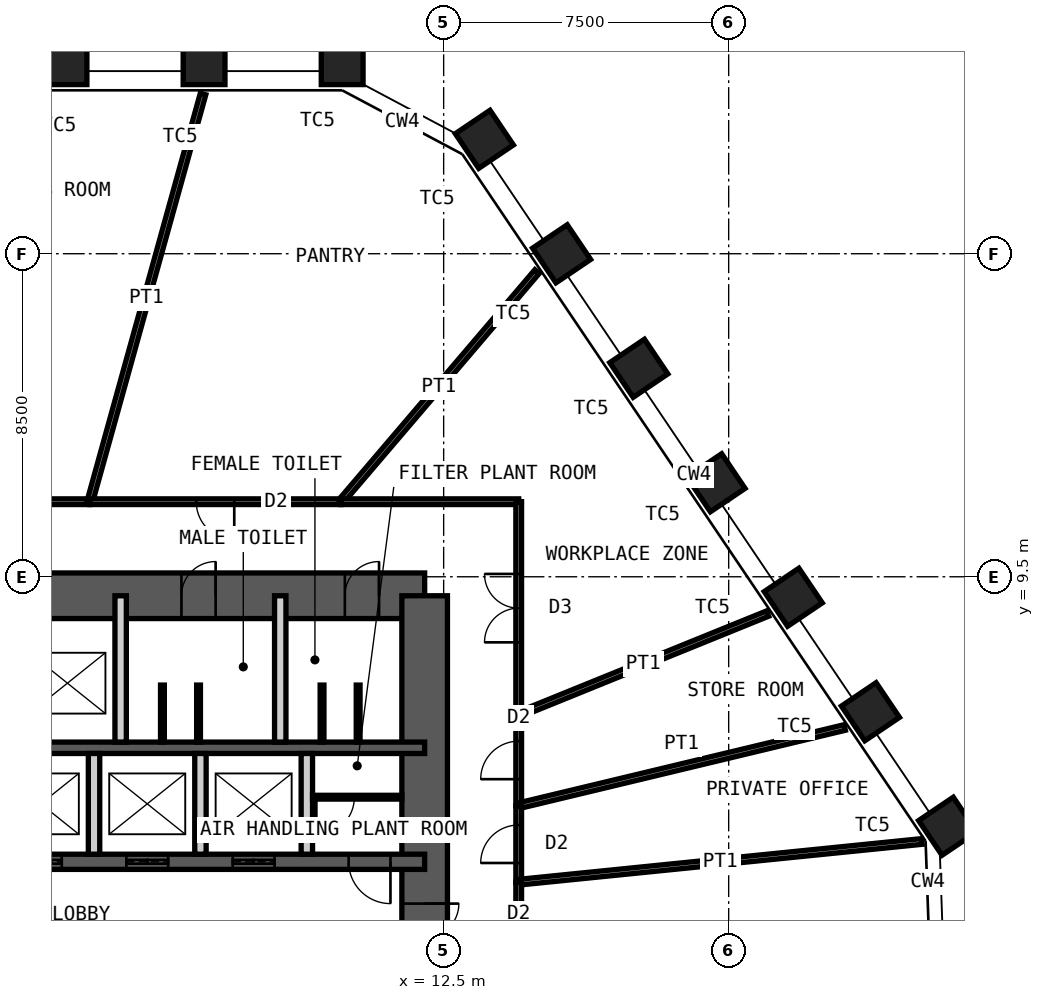
"""IFC4 building model, lengths in metres.
Left out: names, types, materials, properties, quantities, classifications, styles, units other than length and angle.
Written with IfcOpenShell. Run it as: python <this file> out.ifc"""

import sys

from ifc_helpers import new_model, si_unit, direction, frame, frame_2d, origin, origin_2d, place, context, subcontext, project, spatial, rectangle, hollow_rectangle, extrude, element, fill, save


model = new_model("IFC4")
c1 = context("Model", 3, precision=1e-05, world=origin(), true_north=direction((0.0, 1.0)))
c2 = subcontext(c1, "Body", "Model", "MODEL_VIEW")
j1 = project(units=[si_unit("LENGTHUNIT", "METRE"), si_unit("PLANEANGLEUNIT", "RADIAN")], contexts=[c1])
p1 = place(None, origin())
s1 = spatial("IfcSite", under=j1, at=p1, CompositionType="ELEMENT")
p2 = place(p1, origin())
s2 = spatial("IfcBuilding", under=s1, at=p2, CompositionType="ELEMENT")
p3 = place(p2, frame((0.0, 0.0, 209.8)))
s3 = spatial("IfcBuildingStorey", under=s2, at=p3, CompositionType="ELEMENT", Elevation=209.8)
for number, where, z_axis, x_axis in (
    (1, (2.562, 23.0, 0.0), (0.0, 0.0, 1.0), (-1.0, 0.0, 0.0)),
    (2, (6.196, 23.0, 0.0), (0.0, 0.0, 1.0), (-1.0, 0.0, 0.0)),
    (3, (9.829, 23.0, 0.0), (0.0, 0.0, 1.0), (-1.0, 0.0, 0.0)),
    (4, (13.571, 21.01, 0.0), (0.0, 0.0, 1.0), (-0.559, 0.829, 0.0)),
    (5, (15.603, 17.998, 0.0), (0.0, 0.0, 1.0), (-0.559, 0.829, 0.0)),
    (6, (17.635, 14.986, 0.0), (0.0, 0.0, 1.0), (-0.559, 0.829, 0.0)),
    (7, (19.667, 11.973, 0.0), (0.0, 0.0, 1.0), (-0.559, 0.829, 0.0)),
    (8, (21.699, 8.961, 0.0), (0.0, 0.0, 1.0), (-0.559, 0.829, 0.0)),
    (9, (23.731, 5.948, 0.0), (0.0, 0.0, 1.0), (-0.559, 0.829, 0.0)),
    (10, (25.762, 2.936, 0.0), (0.0, 0.0, 1.0), (-0.559, 0.829, 0.0)),
):
    element("IfcColumn", number, at=place(p3, frame(where, z_axis=z_axis, x_axis=x_axis)), inside=s3, PredefinedType="COLUMN", context=c2, shape_type="SweptSolid", body=[
        extrude(hollow_rectangle(XDim=1.1, YDim=1.1, WallThickness=0.07, at=origin_2d()), origin(), (0.0, 0.0, 1.0), 4.2),
    ])
p4 = place(p3, frame((-12.0, 9.0, 0.0), z_axis=(0.0, 0.0, 1.0), x_axis=(1.0, 0.0, 0.0)))
e11 = element("IfcWall", 11, at=p4, inside=s3, PredefinedType="SHEAR", context=c2, shape_type="SweptSolid", body=[
    extrude(rectangle(XDim=24.0, YDim=1.2, at=frame_2d((12.0, 0.0))), origin(), (0.0, 0.0, 1.0), 4.2),
])
p5 = place(p4, frame((10.4, 0.0, 0.0)))
e12 = element("IfcOpeningElement", 12, at=p5, cuts=e11, PredefinedType="OPENING", context=c2, shape_type="SweptSolid", body=[
    extrude(rectangle(XDim=1.0, YDim=2.1, at=frame_2d((0.5, 1.05))), frame((0.0, 0.61, 0.0), z_axis=(0.0, -1.0, 0.0), x_axis=(1.0, 0.0, 0.0)), (0.0, 0.0, 1.0), 1.22),
])
p6 = place(p4, frame((17.6, 0.0, 0.0)))
e13 = element("IfcOpeningElement", 13, at=p6, cuts=e11, PredefinedType="OPENING", context=c2, shape_type="SweptSolid", body=[
    extrude(rectangle(XDim=0.9, YDim=2.1, at=frame_2d((0.45, 1.05))), frame((0.0, 0.61, 0.0), z_axis=(0.0, -1.0, 0.0), x_axis=(1.0, 0.0, 0.0)), (0.0, 0.0, 1.0), 1.22),
])
p7 = place(p4, frame((21.9, 0.0, 0.0)))
e14 = element("IfcOpeningElement", 14, at=p7, cuts=e11, PredefinedType="OPENING", context=c2, shape_type="SweptSolid", body=[
    extrude(rectangle(XDim=0.9, YDim=2.1, at=frame_2d((0.45, 1.05))), frame((0.0, 0.61, 0.0), z_axis=(0.0, -1.0, 0.0), x_axis=(1.0, 0.0, 0.0)), (0.0, 0.0, 1.0), 1.22),
])
p8 = place(p3, frame((12.0, -9.0, 0.0), z_axis=(0.0, 0.0, 1.0), x_axis=(0.0, 1.0, 0.0)))
e15 = element("IfcWall", 15, at=p8, inside=s3, PredefinedType="SHEAR", context=c2, shape_type="SweptSolid", body=[
    extrude(rectangle(XDim=18.0, YDim=1.2, at=frame_2d((9.0, 0.0))), origin(), (0.0, 0.0, 1.0), 4.2),
])
p9 = place(p8, frame((8.1, 0.0, 0.0)))
e16 = element("IfcOpeningElement", 16, at=p9, cuts=e15, PredefinedType="OPENING", context=c2, shape_type="SweptSolid", body=[
    extrude(rectangle(XDim=1.8, YDim=2.1, at=frame_2d((0.9, 1.05))), frame((0.0, 0.61, 0.0), z_axis=(0.0, -1.0, 0.0), x_axis=(1.0, 0.0, 0.0)), (0.0, 0.0, 1.0), 1.22),
])
p10 = place(p3, frame((-12.0, 5.0, 0.0), z_axis=(0.0, 0.0, 1.0), x_axis=(1.0, 0.0, 0.0)))
e17 = element("IfcWall", 17, at=p10, inside=s3, PredefinedType="SHEAR", context=c2, shape_type="SweptSolid", body=[
    extrude(rectangle(XDim=24.0, YDim=0.3, at=frame_2d((12.0, 0.0))), origin(), (0.0, 0.0, 1.0), 4.2),
])
p11 = place(p3, frame((-12.0, 2.0, 0.0), z_axis=(0.0, 0.0, 1.0), x_axis=(1.0, 0.0, 0.0)))
e18 = element("IfcWall", 18, at=p11, inside=s3, PredefinedType="SHEAR", context=c2, shape_type="SweptSolid", body=[
    extrude(rectangle(XDim=24.0, YDim=0.4, at=frame_2d((12.0, 0.0))), origin(), (0.0, 0.0, 1.0), 4.2),
])
p12 = place(p11, frame((2.4, 0.0, 0.0)))
e19 = element("IfcOpeningElement", 19, at=p12, cuts=e18, PredefinedType="OPENING", context=c2, shape_type="SweptSolid", body=[
    extrude(rectangle(XDim=1.1, YDim=2.1, at=frame_2d((0.55, 1.05))), frame((0.0, 0.21, 0.0), z_axis=(0.0, -1.0, 0.0), x_axis=(1.0, 0.0, 0.0)), (0.0, 0.0, 1.0), 0.42),
])
p13 = place(p11, frame((22.0, 0.0, 0.0)))
e20 = element("IfcOpeningElement", 20, at=p13, cuts=e18, PredefinedType="OPENING", context=c2, shape_type="SweptSolid", body=[
    extrude(rectangle(XDim=1.1, YDim=2.1, at=frame_2d((0.55, 1.05))), frame((0.0, 0.21, 0.0), z_axis=(0.0, -1.0, 0.0), x_axis=(1.0, 0.0, 0.0)), (0.0, 0.0, 1.0), 0.42),
])
p14 = place(p11, frame((10.15, 0.0, 0.0)))
e21 = element("IfcOpeningElement", 21, at=p14, cuts=e18, PredefinedType="OPENING", context=c2, shape_type="SweptSolid", body=[
    extrude(rectangle(XDim=1.0, YDim=2.1, at=frame_2d((0.5, 1.05))), frame((0.0, 0.21, 0.0), z_axis=(0.0, -1.0, 0.0), x_axis=(1.0, 0.0, 0.0)), (0.0, 0.0, 1.0), 0.42),
])
p15 = place(p11, frame((6.9, 0.0, 0.0)))
e22 = element("IfcOpeningElement", 22, at=p15, cuts=e18, PredefinedType="OPENING", context=c2, shape_type="SweptSolid", body=[
    extrude(rectangle(XDim=1.0, YDim=2.1, at=frame_2d((0.5, 1.05))), frame((0.0, 0.21, 0.0), z_axis=(0.0, -1.0, 0.0), x_axis=(1.0, 0.0, 0.0)), (0.0, 0.0, 1.0), 0.42),
])
p16 = place(p11, frame((13.35, 0.0, 0.0)))
e23 = element("IfcOpeningElement", 23, at=p16, cuts=e18, PredefinedType="OPENING", context=c2, shape_type="SweptSolid", body=[
    extrude(rectangle(XDim=1.1, YDim=2.4, at=frame_2d((0.55, 1.2))), frame((0.0, 0.21, 0.0), z_axis=(0.0, -1.0, 0.0), x_axis=(1.0, 0.0, 0.0)), (0.0, 0.0, 1.0), 0.42),
])
p17 = place(p11, frame((16.15, 0.0, 0.0)))
e24 = element("IfcOpeningElement", 24, at=p17, cuts=e18, PredefinedType="OPENING", context=c2, shape_type="SweptSolid", body=[
    extrude(rectangle(XDim=1.1, YDim=2.4, at=frame_2d((0.55, 1.2))), frame((0.0, 0.21, 0.0), z_axis=(0.0, -1.0, 0.0), x_axis=(1.0, 0.0, 0.0)), (0.0, 0.0, 1.0), 0.42),
])
p18 = place(p11, frame((18.95, 0.0, 0.0)))
e25 = element("IfcOpeningElement", 25, at=p18, cuts=e18, PredefinedType="OPENING", context=c2, shape_type="SweptSolid", body=[
    extrude(rectangle(XDim=1.1, YDim=2.4, at=frame_2d((0.55, 1.2))), frame((0.0, 0.21, 0.0), z_axis=(0.0, -1.0, 0.0), x_axis=(1.0, 0.0, 0.0)), (0.0, 0.0, 1.0), 0.42),
])
for number, where, z_axis, x_axis in (
    (26, (4.0, 5.15, 0.0), (0.0, 0.0, 1.0), (0.0, 1.0, 0.0)),
    (27, (8.2, 5.15, 0.0), (0.0, 0.0, 1.0), (0.0, 1.0, 0.0)),
):
    element("IfcWall", number, at=place(p3, frame(where, z_axis=z_axis, x_axis=x_axis)), inside=s3, PredefinedType="PARTITIONING", context=c2, shape_type="SweptSolid", body=[
        extrude(rectangle(XDim=3.85, YDim=0.3, at=frame_2d((1.925, 0.0))), origin(), (0.0, 0.0, 1.0), 3.98),
    ])
for number, where, z_axis, x_axis in (
    (28, (3.3, 2.2, 0.0), (0.0, 0.0, 1.0), (0.0, 1.0, 0.0)),
    (29, (6.1, 2.2, 0.0), (0.0, 0.0, 1.0), (0.0, 1.0, 0.0)),
    (30, (8.9, 2.2, 0.0), (0.0, 0.0, 1.0), (0.0, 1.0, 0.0)),
):
    element("IfcWall", number, at=place(p3, frame(where, z_axis=z_axis, x_axis=x_axis)), inside=s3, PredefinedType="PARTITIONING", context=c2, shape_type="SweptSolid", body=[
        extrude(rectangle(XDim=2.65, YDim=0.3, at=frame_2d((1.325, 0.0))), origin(), (0.0, 0.0, 1.0), 3.98),
    ])
p19 = place(p3, frame((9.05, 3.7, 0.0), z_axis=(0.0, 0.0, 1.0), x_axis=(1.0, 0.0, 0.0)))
e31 = element("IfcWall", 31, at=p19, inside=s3, PredefinedType="PARTITIONING", context=c2, shape_type="SweptSolid", body=[
    extrude(rectangle(XDim=2.35, YDim=0.1, at=frame_2d((1.175, 0.0))), origin(), (0.0, 0.0, 1.0), 3.98),
])
p20 = place(p19, frame((0.1, 0.0, 0.0)))
e32 = element("IfcOpeningElement", 32, at=p20, cuts=e31, PredefinedType="OPENING", context=c2, shape_type="SweptSolid", body=[
    extrude(rectangle(XDim=1.0, YDim=2.4, at=frame_2d((0.5, 1.2))), frame((0.0, 0.06, 0.0), z_axis=(0.0, -1.0, 0.0), x_axis=(1.0, 0.0, 0.0)), (0.0, 0.0, 1.0), 0.12),
])
for number, where, z_axis, x_axis in (
    (33, (5.1, 5.15, 0.0), (0.0, 0.0, 1.0), (0.0, 1.0, 0.0)),
    (34, (6.05, 5.15, 0.0), (0.0, 0.0, 1.0), (0.0, 1.0, 0.0)),
    (35, (9.3, 5.15, 0.0), (0.0, 0.0, 1.0), (0.0, 1.0, 0.0)),
    (36, (10.25, 5.15, 0.0), (0.0, 0.0, 1.0), (0.0, 1.0, 0.0)),
):
    element("IfcWall", number, at=place(p3, frame(where, z_axis=z_axis, x_axis=x_axis)), inside=s3, PredefinedType="PARTITIONING", context=c2, shape_type="SweptSolid", body=[
        extrude(rectangle(XDim=1.5, YDim=0.1, at=frame_2d((0.75, 0.0))), origin(), (0.0, 0.0, 1.0), 2.1),
    ])
p21 = place(p3, frame((-0.551, 11.475, 0.0), z_axis=(0.0, 0.0, 1.0), x_axis=(1.0, 0.0, 0.0)))
e37 = element("IfcWall", 37, at=p21, inside=s3, PredefinedType="PARTITIONING", context=c2, shape_type="SweptSolid", body=[
    extrude(rectangle(XDim=3.74, YDim=0.15, at=frame_2d((1.87, 0.0))), origin(), (0.0, 0.0, 1.0), 4.03),
])
p22 = place(p21, frame((1.37, 0.0, 0.0)))
e38 = element("IfcOpeningElement", 38, at=p22, cuts=e37, PredefinedType="OPENING", context=c2, shape_type="SweptSolid", body=[
    extrude(rectangle(XDim=1.0, YDim=2.4, at=frame_2d((0.5, 1.2))), frame((0.0, 0.085, 0.0), z_axis=(0.0, -1.0, 0.0), x_axis=(1.0, 0.0, 0.0)), (0.0, 0.0, 1.0), 0.17),
])
p23 = place(p3, frame((6.169, 22.204, 0.0), z_axis=(0.0, 0.0, 1.0), x_axis=(-0.26769135876, -0.963504715321, 0.0)))
e39 = element("IfcWall", 39, at=p23, inside=s3, PredefinedType="PARTITIONING", context=c2, shape_type="SweptSolid", body=[
    extrude(rectangle(XDim=11.135, YDim=0.15, at=frame_2d((5.567, 0.0))), origin(), (0.0, 0.0, 1.0), 3.43),
])
p24 = place(p3, frame((3.188, 11.475, 0.0), z_axis=(0.0, 0.0, 1.0), x_axis=(1.0, 0.0, 0.0)))
e40 = element("IfcWall", 40, at=p24, inside=s3, PredefinedType="PARTITIONING", context=c2, shape_type="SweptSolid", body=[
    extrude(rectangle(XDim=6.603, YDim=0.15, at=frame_2d((3.301, 0.0))), origin(), (0.0, 0.0, 1.0), 4.03),
])
p25 = place(p24, frame((2.802, 0.0, 0.0)))
e41 = element("IfcOpeningElement", 41, at=p25, cuts=e40, PredefinedType="OPENING", context=c2, shape_type="SweptSolid", body=[
    extrude(rectangle(XDim=1.0, YDim=2.4, at=frame_2d((0.5, 1.2))), frame((0.0, 0.085, 0.0), z_axis=(0.0, -1.0, 0.0), x_axis=(1.0, 0.0, 0.0)), (0.0, 0.0, 1.0), 0.17),
])
p26 = place(p3, frame((14.958, 17.531, 0.0), z_axis=(0.0, 0.0, 1.0), x_axis=(-0.649097500837, -0.760705221756, 0.0)))
e42 = element("IfcWall", 42, at=p26, inside=s3, PredefinedType="PARTITIONING", context=c2, shape_type="SweptSolid", body=[
    extrude(rectangle(XDim=7.96, YDim=0.15, at=frame_2d((3.98, 0.0))), origin(), (0.0, 0.0, 1.0), 3.43),
])
p27 = place(p3, frame((9.791, 11.475, 0.0), z_axis=(0.0, 0.0, 1.0), x_axis=(1.0, 0.0, 0.0)))
e43 = element("IfcWall", 43, at=p27, inside=s3, PredefinedType="PARTITIONING", context=c2, shape_type="SweptSolid", body=[
    extrude(rectangle(XDim=4.684, YDim=0.15, at=frame_2d((2.342, 0.0))), origin(), (0.0, 0.0, 1.0), 4.03),
])
p28 = place(p3, frame((14.475, 11.475, 0.0), z_axis=(0.0, 0.0, 1.0), x_axis=(0.0, -1.0, 0.0)))
e44 = element("IfcWall", 44, at=p28, inside=s3, PredefinedType="PARTITIONING", context=c2, shape_type="SweptSolid", body=[
    extrude(rectangle(XDim=5.601, YDim=0.15, at=frame_2d((2.801, 0.0))), origin(), (0.0, 0.0, 1.0), 4.03),
])
p29 = place(p28, frame((1.901, 0.0, 0.0)))
e45 = element("IfcOpeningElement", 45, at=p29, cuts=e44, PredefinedType="OPENING", context=c2, shape_type="SweptSolid", body=[
    extrude(rectangle(XDim=1.8, YDim=2.4, at=frame_2d((0.9, 1.2))), frame((0.0, 0.085, 0.0), z_axis=(0.0, -1.0, 0.0), x_axis=(1.0, 0.0, 0.0)), (0.0, 0.0, 1.0), 0.17),
])
p30 = place(p3, frame((21.026, 8.532, 0.0), z_axis=(0.0, 0.0, 1.0), x_axis=(-0.926617028548, -0.376006492503, 0.0)))
e46 = element("IfcWall", 46, at=p30, inside=s3, PredefinedType="PARTITIONING", context=c2, shape_type="SweptSolid", body=[
    extrude(rectangle(XDim=7.07, YDim=0.15, at=frame_2d((3.535, 0.0))), origin(), (0.0, 0.0, 1.0), 3.43),
])
p31 = place(p3, frame((14.475, 5.874, 0.0), z_axis=(0.0, 0.0, 1.0), x_axis=(0.0, -1.0, 0.0)))
e47 = element("IfcWall", 47, at=p31, inside=s3, PredefinedType="PARTITIONING", context=c2, shape_type="SweptSolid", body=[
    extrude(rectangle(XDim=2.399, YDim=0.15, at=frame_2d((1.2, 0.0))), origin(), (0.0, 0.0, 1.0), 4.03),
])
p32 = place(p31, frame((0.699, 0.0, 0.0)))
e48 = element("IfcOpeningElement", 48, at=p32, cuts=e47, PredefinedType="OPENING", context=c2, shape_type="SweptSolid", body=[
    extrude(rectangle(XDim=1.0, YDim=2.4, at=frame_2d((0.5, 1.2))), frame((0.0, 0.085, 0.0), z_axis=(0.0, -1.0, 0.0), x_axis=(1.0, 0.0, 0.0)), (0.0, 0.0, 1.0), 0.17),
])
p33 = place(p3, frame((23.053, 5.534, 0.0), z_axis=(0.0, 0.0, 1.0), x_axis=(-0.972377252501, -0.233414821335, 0.0)))
e49 = element("IfcWall", 49, at=p33, inside=s3, PredefinedType="PARTITIONING", context=c2, shape_type="SweptSolid", body=[
    extrude(rectangle(XDim=8.822, YDim=0.15, at=frame_2d((4.411, 0.0))), origin(), (0.0, 0.0, 1.0), 3.43),
])
p34 = place(p3, frame((14.475, 3.475, 0.0), z_axis=(0.0, 0.0, 1.0), x_axis=(0.0, -1.0, 0.0)))
e50 = element("IfcWall", 50, at=p34, inside=s3, PredefinedType="PARTITIONING", context=c2, shape_type="SweptSolid", body=[
    extrude(rectangle(XDim=2.012, YDim=0.15, at=frame_2d((1.006, 0.0))), origin(), (0.0, 0.0, 1.0), 4.03),
])
p35 = place(p34, frame((0.506, 0.0, 0.0)))
e51 = element("IfcOpeningElement", 51, at=p35, cuts=e50, PredefinedType="OPENING", context=c2, shape_type="SweptSolid", body=[
    extrude(rectangle(XDim=1.0, YDim=2.4, at=frame_2d((0.5, 1.2))), frame((0.0, 0.085, 0.0), z_axis=(0.0, -1.0, 0.0), x_axis=(1.0, 0.0, 0.0)), (0.0, 0.0, 1.0), 0.17),
])
p36 = place(p3, frame((25.083, 2.535, 0.0), z_axis=(0.0, 0.0, 1.0), x_axis=(-0.994932122767, -0.10054884925, 0.0)))
e52 = element("IfcWall", 52, at=p36, inside=s3, PredefinedType="PARTITIONING", context=c2, shape_type="SweptSolid", body=[
    extrude(rectangle(XDim=10.662, YDim=0.15, at=frame_2d((5.331, 0.0))), origin(), (0.0, 0.0, 1.0), 2.93),
])
p37 = place(p3, frame((14.475, 1.463, 0.0), z_axis=(0.0, 0.0, 1.0), x_axis=(0.0, -1.0, 0.0)))
e53 = element("IfcWall", 53, at=p37, inside=s3, PredefinedType="PARTITIONING", context=c2, shape_type="SweptSolid", body=[
    extrude(rectangle(XDim=3.885, YDim=0.15, at=frame_2d((1.942, 0.0))), origin(), (0.0, 0.0, 1.0), 4.03),
])
p38 = place(p37, frame((1.442, 0.0, 0.0)))
e54 = element("IfcOpeningElement", 54, at=p38, cuts=e53, PredefinedType="OPENING", context=c2, shape_type="SweptSolid", body=[
    extrude(rectangle(XDim=1.0, YDim=2.4, at=frame_2d((0.5, 1.2))), frame((0.0, 0.085, 0.0), z_axis=(0.0, -1.0, 0.0), x_axis=(1.0, 0.0, 0.0)), (0.0, 0.0, 1.0), 0.17),
])
p39 = place(p6, origin())
e55 = element("IfcDoor", 55, at=p39, inside=s3, OperationType="SINGLE_SWING_LEFT", PredefinedType="DOOR", context=c2, shape_type="SweptSolid", body=[
    extrude(rectangle(XDim=0.9, YDim=2.1, at=frame_2d((0.45, 1.05))), frame((0.0, 0.025, 0.0), z_axis=(0.0, -1.0, 0.0), x_axis=(1.0, 0.0, 0.0)), (0.0, 0.0, 1.0), 0.05),
])
fill(e13, e55)
p40 = place(p7, origin())
e56 = element("IfcDoor", 56, at=p40, inside=s3, OperationType="SINGLE_SWING_LEFT", PredefinedType="DOOR", context=c2, shape_type="SweptSolid", body=[
    extrude(rectangle(XDim=0.9, YDim=2.1, at=frame_2d((0.45, 1.05))), frame((0.0, 0.025, 0.0), z_axis=(0.0, -1.0, 0.0), x_axis=(1.0, 0.0, 0.0)), (0.0, 0.0, 1.0), 0.05),
])
fill(e14, e56)
p41 = place(p13, origin())
e57 = element("IfcDoor", 57, at=p41, inside=s3, OperationType="SINGLE_SWING_RIGHT", PredefinedType="DOOR", context=c2, shape_type="SweptSolid", body=[
    extrude(rectangle(XDim=1.1, YDim=2.1, at=frame_2d((0.55, 1.05))), frame((0.0, 0.025, 0.0), z_axis=(0.0, -1.0, 0.0), x_axis=(1.0, 0.0, 0.0)), (0.0, 0.0, 1.0), 0.05),
])
fill(e20, e57)
p42 = place(p9, origin())
e58 = element("IfcDoor", 58, at=p42, inside=s3, OperationType="DOUBLE_DOOR_DOUBLE_SWING", PredefinedType="DOOR", context=c2, shape_type="SweptSolid", body=[
    extrude(rectangle(XDim=1.8, YDim=2.1, at=frame_2d((0.9, 1.05))), frame((0.0, 0.025, 0.0), z_axis=(0.0, -1.0, 0.0), x_axis=(1.0, 0.0, 0.0)), (0.0, 0.0, 1.0), 0.05),
])
fill(e16, e58)
p43 = place(p16, origin())
e59 = element("IfcDoor", 59, at=p43, inside=s3, OperationType="DOUBLE_DOOR_SLIDING", PredefinedType="DOOR", context=c2, shape_type="SweptSolid", body=[
    extrude(rectangle(XDim=1.1, YDim=2.4, at=frame_2d((0.55, 1.2))), frame((0.0, 0.025, 0.0), z_axis=(0.0, -1.0, 0.0), x_axis=(1.0, 0.0, 0.0)), (0.0, 0.0, 1.0), 0.05),
])
fill(e23, e59)
p44 = place(p17, origin())
e60 = element("IfcDoor", 60, at=p44, inside=s3, OperationType="DOUBLE_DOOR_SLIDING", PredefinedType="DOOR", context=c2, shape_type="SweptSolid", body=[
    extrude(rectangle(XDim=1.1, YDim=2.4, at=frame_2d((0.55, 1.2))), frame((0.0, 0.025, 0.0), z_axis=(0.0, -1.0, 0.0), x_axis=(1.0, 0.0, 0.0)), (0.0, 0.0, 1.0), 0.05),
])
fill(e24, e60)
p45 = place(p18, origin())
e61 = element("IfcDoor", 61, at=p45, inside=s3, OperationType="DOUBLE_DOOR_SLIDING", PredefinedType="DOOR", context=c2, shape_type="SweptSolid", body=[
    extrude(rectangle(XDim=1.1, YDim=2.4, at=frame_2d((0.55, 1.2))), frame((0.0, 0.025, 0.0), z_axis=(0.0, -1.0, 0.0), x_axis=(1.0, 0.0, 0.0)), (0.0, 0.0, 1.0), 0.05),
])
fill(e25, e61)
p46 = place(p20, origin())
e62 = element("IfcDoor", 62, at=p46, inside=s3, OperationType="SINGLE_SWING_LEFT", PredefinedType="DOOR", context=c2, shape_type="SweptSolid", body=[
    extrude(rectangle(XDim=1.0, YDim=2.4, at=frame_2d((0.5, 1.2))), frame((0.0, 0.025, 0.0), z_axis=(0.0, -1.0, 0.0), x_axis=(1.0, 0.0, 0.0)), (0.0, 0.0, 1.0), 0.05),
])
fill(e32, e62)
p47 = place(p25, origin())
e63 = element("IfcDoor", 63, at=p47, inside=s3, OperationType="SINGLE_SWING_RIGHT", PredefinedType="DOOR", context=c2, shape_type="SweptSolid", body=[
    extrude(rectangle(XDim=1.0, YDim=2.4, at=frame_2d((0.5, 1.2))), frame((0.0, 0.025, 0.0), z_axis=(0.0, -1.0, 0.0), x_axis=(1.0, 0.0, 0.0)), (0.0, 0.0, 1.0), 0.05),
])
fill(e41, e63)
p48 = place(p29, origin())
e64 = element("IfcDoor", 64, at=p48, inside=s3, OperationType="DOUBLE_DOOR_DOUBLE_SWING", PredefinedType="DOOR", context=c2, shape_type="SweptSolid", body=[
    extrude(rectangle(XDim=1.8, YDim=2.4, at=frame_2d((0.9, 1.2))), frame((0.0, 0.025, 0.0), z_axis=(0.0, -1.0, 0.0), x_axis=(1.0, 0.0, 0.0)), (0.0, 0.0, 1.0), 0.05),
])
fill(e45, e64)
p49 = place(p32, origin())
e65 = element("IfcDoor", 65, at=p49, inside=s3, OperationType="SINGLE_SWING_RIGHT", PredefinedType="DOOR", context=c2, shape_type="SweptSolid", body=[
    extrude(rectangle(XDim=1.0, YDim=2.4, at=frame_2d((0.5, 1.2))), frame((0.0, 0.025, 0.0), z_axis=(0.0, -1.0, 0.0), x_axis=(1.0, 0.0, 0.0)), (0.0, 0.0, 1.0), 0.05),
])
fill(e48, e65)
p50 = place(p35, origin())
e66 = element("IfcDoor", 66, at=p50, inside=s3, OperationType="SINGLE_SWING_RIGHT", PredefinedType="DOOR", context=c2, shape_type="SweptSolid", body=[
    extrude(rectangle(XDim=1.0, YDim=2.4, at=frame_2d((0.5, 1.2))), frame((0.0, 0.025, 0.0), z_axis=(0.0, -1.0, 0.0), x_axis=(1.0, 0.0, 0.0)), (0.0, 0.0, 1.0), 0.05),
])
fill(e51, e66)
save(model, sys.argv[1])
